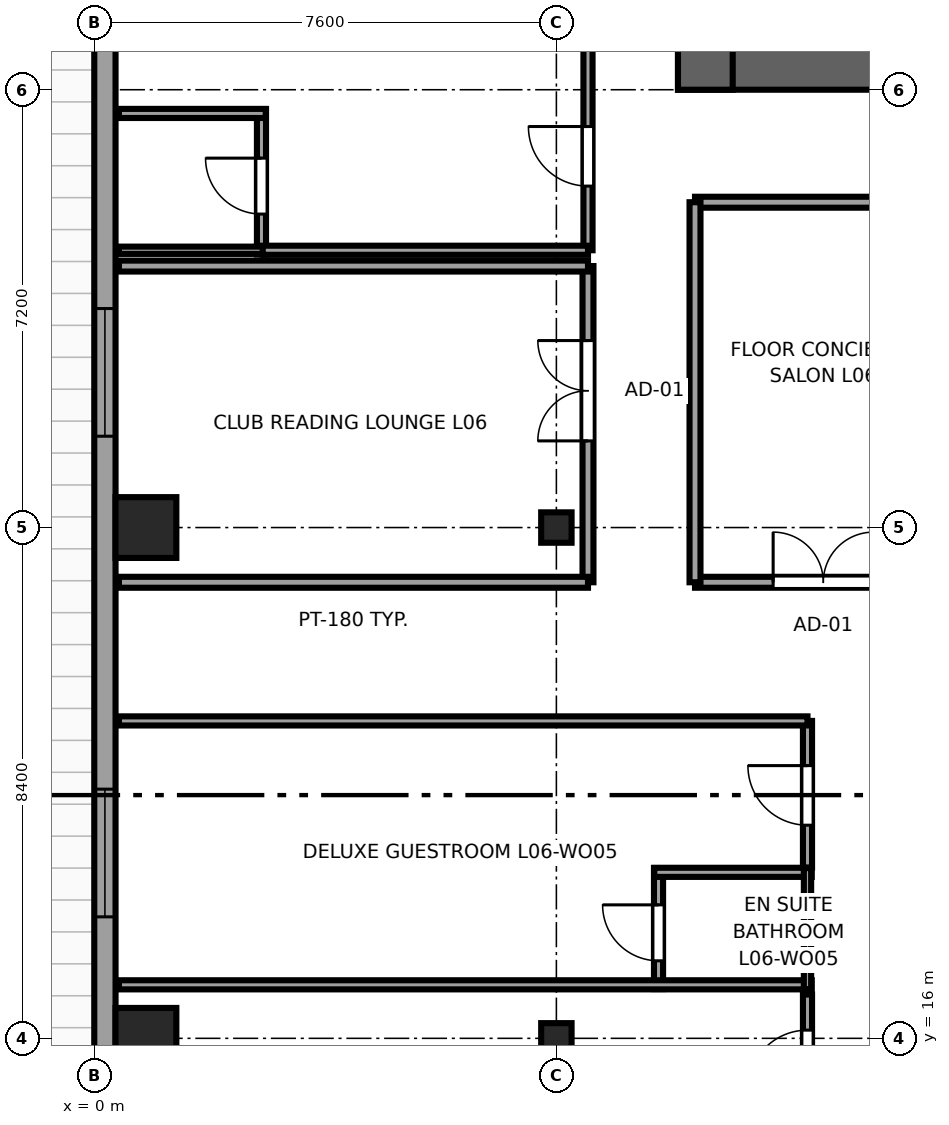
"""IFC4 building model, lengths in metres.
Left out: names, types, materials, properties, quantities, classifications, styles, units other than length and angle.
Written with IfcOpenShell. Run it as: python <this file> out.ifc"""

import sys

from ifc_helpers import new_model, si_unit, direction, frame, frame_2d, origin, origin_2d, place, context, subcontext, project, spatial, rectangle, i_section, extrude, source, transform, mapped, element, fill, save


model = new_model("IFC4")
c1 = context("Model", 3, precision=1e-05, world=origin(), true_north=direction((0.0, 1.0)))
c2 = subcontext(c1, "Body", "Model", "MODEL_VIEW")
j1 = project(units=[si_unit("LENGTHUNIT", "METRE"), si_unit("PLANEANGLEUNIT", "RADIAN")], contexts=[c1])
p1 = place(None, origin())
s1 = spatial("IfcSite", under=j1, at=p1, CompositionType="ELEMENT")
p2 = place(p1, origin())
s2 = spatial("IfcBuilding", under=s1, at=p2, CompositionType="ELEMENT")
p3 = place(p2, frame((0.0, 0.0, 32.0)))
s3 = spatial("IfcBuildingStorey", under=s2, at=p3, CompositionType="ELEMENT", Elevation=32.0)
p4 = place(p3, frame((9.6, 32.05, 0.0), z_axis=(0.0, 0.0, 1.0), x_axis=(1.0, 0.0, 0.0)))
e1 = element("IfcWall", 1, at=p4, inside=s3, PredefinedType="SHEAR", context=c2, shape_type="SweptSolid", body=[
    extrude(rectangle(XDim=26.8, YDim=0.9, at=frame_2d((13.4, 0.0))), origin(), (0.0, 0.0, 1.0), 3.55),
])
p5 = place(p4, frame((7.85, 0.0, 0.0), z_axis=(0.0, 0.0, 1.0), x_axis=(-1.0, 0.0, 0.0)))
e2 = element("IfcOpeningElement", 2, at=p5, cuts=e1, PredefinedType="OPENING", context=c2, shape_type="SweptSolid", body=[
    extrude(rectangle(XDim=1.5, YDim=2.04, at=frame_2d((0.75, 1.02))), frame((0.0, 0.46, 0.0), z_axis=(0.0, -1.0, 0.0), x_axis=(1.0, 0.0, 0.0)), (0.0, 0.0, 1.0), 0.92),
])
p6 = place(p4, frame((14.15, 0.0, 0.0), z_axis=(0.0, 0.0, 1.0), x_axis=(-1.0, 0.0, 0.0)))
e3 = element("IfcOpeningElement", 3, at=p6, cuts=e1, PredefinedType="OPENING", context=c2, shape_type="SweptSolid", body=[
    extrude(rectangle(XDim=1.5, YDim=2.04, at=frame_2d((0.75, 1.02))), frame((0.0, 0.46, 0.0), z_axis=(0.0, -1.0, 0.0), x_axis=(1.0, 0.0, 0.0)), (0.0, 0.0, 1.0), 0.92),
])
p7 = place(p4, frame((20.45, 0.0, 0.0), z_axis=(0.0, 0.0, 1.0), x_axis=(-1.0, 0.0, 0.0)))
e4 = element("IfcOpeningElement", 4, at=p7, cuts=e1, PredefinedType="OPENING", context=c2, shape_type="SweptSolid", body=[
    extrude(rectangle(XDim=1.5, YDim=2.04, at=frame_2d((0.75, 1.02))), frame((0.0, 0.46, 0.0), z_axis=(0.0, -1.0, 0.0), x_axis=(1.0, 0.0, 0.0)), (0.0, 0.0, 1.0), 0.92),
])
p8 = place(p3, frame((10.05, 31.6, 0.0), z_axis=(0.0, 0.0, 1.0), x_axis=(0.0, 1.0, 0.0)))
e5 = element("IfcWall", 5, at=p8, inside=s3, PredefinedType="SHEAR", context=c2, shape_type="SweptSolid", body=[
    extrude(rectangle(XDim=13.6, YDim=0.9, at=frame_2d((6.8, 0.0))), origin(), (0.0, 0.0, 1.0), 3.55),
])
m1 = source(origin(), c2, "Body", "SweptSolid", [
    extrude(rectangle(XDim=1.0, YDim=1.0, at=origin_2d()), origin(), (0.0, 0.0, 1.0), 3.55),
])
for number, where, z_axis, x_axis in (
    (6, (0.85, 16.0, 0.0), (0.0, 0.0, 1.0), (1.0, 0.0, 0.0)),
    (7, (0.85, 24.4, 0.0), (0.0, 0.0, 1.0), (1.0, 0.0, 0.0)),
):
    element("IfcColumn", number, at=place(p3, frame(where, z_axis=z_axis, x_axis=x_axis)), inside=s3, PredefinedType="COLUMN", context=c2, shape_type="MappedRepresentation", body=[
        mapped(m1, transform((0.0, 0.0, 0.0), x_axis=(1.0, 0.0, 0.0), y_axis=(0.0, 1.0, 0.0), z_axis=(0.0, 0.0, 1.0), scale=1.0)),
    ])
m2 = source(origin(), c2, "Body", "SweptSolid", [
    extrude(i_section(OverallWidth=0.5, OverallDepth=0.5, WebThickness=0.028, FlangeThickness=0.045, at=origin_2d()), origin(), (0.0, 0.0, 1.0), 3.55),
])
for number, where, z_axis, x_axis in (
    (8, (7.6, 16.0, 0.0), (0.0, 0.0, 1.0), (1.0, 0.0, 0.0)),
    (9, (7.6, 24.4, 0.0), (0.0, 0.0, 1.0), (1.0, 0.0, 0.0)),
):
    element("IfcColumn", number, at=place(p3, frame(where, z_axis=z_axis, x_axis=x_axis)), inside=s3, PredefinedType="COLUMN", context=c2, shape_type="MappedRepresentation", body=[
        mapped(m2, transform((0.0, 0.0, 0.0), x_axis=(1.0, 0.0, 0.0), y_axis=(0.0, 1.0, 0.0), z_axis=(0.0, 0.0, 1.0), scale=1.0)),
    ])
p9 = place(p3, frame((0.175, 41.383, 0.0), z_axis=(0.0, 0.0, 1.0), x_axis=(0.0, -1.0, 0.0)))
e10 = element("IfcWall", 10, at=p9, inside=s3, PredefinedType="SOLIDWALL", context=c2, shape_type="SweptSolid", body=[
    extrude(rectangle(XDim=36.766, YDim=0.35, at=frame_2d((18.383, 0.0))), origin(), (0.0, 0.0, 1.0), 3.37),
])
p10 = place(p9, frame((1.526, 0.0, 0.68)))
e11 = element("IfcOpeningElement", 11, at=p10, cuts=e10, PredefinedType="OPENING", context=c2, shape_type="SweptSolid", body=[
    extrude(rectangle(XDim=2.1, YDim=1.9, at=frame_2d((1.05, 0.95))), frame((0.0, 0.185, 0.0), z_axis=(0.0, -1.0, 0.0), x_axis=(1.0, 0.0, 0.0)), (0.0, 0.0, 1.0), 0.37),
])
p11 = place(p9, frame((4.428, 0.0, 0.68)))
e12 = element("IfcOpeningElement", 12, at=p11, cuts=e10, PredefinedType="OPENING", context=c2, shape_type="SweptSolid", body=[
    extrude(rectangle(XDim=2.1, YDim=1.9, at=frame_2d((1.05, 0.95))), frame((0.0, 0.185, 0.0), z_axis=(0.0, -1.0, 0.0), x_axis=(1.0, 0.0, 0.0)), (0.0, 0.0, 1.0), 0.37),
])
p12 = place(p9, frame((13.381, 0.0, 0.68)))
e13 = element("IfcOpeningElement", 13, at=p12, cuts=e10, PredefinedType="OPENING", context=c2, shape_type="SweptSolid", body=[
    extrude(rectangle(XDim=2.1, YDim=1.9, at=frame_2d((1.05, 0.95))), frame((0.0, 0.185, 0.0), z_axis=(0.0, -1.0, 0.0), x_axis=(1.0, 0.0, 0.0)), (0.0, 0.0, 1.0), 0.37),
])
p13 = place(p9, frame((21.285, 0.0, 0.68)))
e14 = element("IfcOpeningElement", 14, at=p13, cuts=e10, PredefinedType="OPENING", context=c2, shape_type="SweptSolid", body=[
    extrude(rectangle(XDim=2.1, YDim=1.9, at=frame_2d((1.05, 0.95))), frame((0.0, 0.185, 0.0), z_axis=(0.0, -1.0, 0.0), x_axis=(1.0, 0.0, 0.0)), (0.0, 0.0, 1.0), 0.37),
])
p14 = place(p9, frame((26.286, 0.0, 0.68)))
e15 = element("IfcOpeningElement", 15, at=p14, cuts=e10, PredefinedType="OPENING", context=c2, shape_type="SweptSolid", body=[
    extrude(rectangle(XDim=2.1, YDim=1.9, at=frame_2d((1.05, 0.95))), frame((0.0, 0.185, 0.0), z_axis=(0.0, -1.0, 0.0), x_axis=(1.0, 0.0, 0.0)), (0.0, 0.0, 1.0), 0.37),
])
p15 = place(p9, frame((29.188, 0.0, 0.68)))
e16 = element("IfcOpeningElement", 16, at=p15, cuts=e10, PredefinedType="OPENING", context=c2, shape_type="SweptSolid", body=[
    extrude(rectangle(XDim=2.1, YDim=1.9, at=frame_2d((1.05, 0.95))), frame((0.0, 0.185, 0.0), z_axis=(0.0, -1.0, 0.0), x_axis=(1.0, 0.0, 0.0)), (0.0, 0.0, 1.0), 0.37),
])
p16 = place(p9, frame((34.079, 0.0, 0.62)))
e17 = element("IfcOpeningElement", 17, at=p16, cuts=e10, PredefinedType="OPENING", context=c2, shape_type="SweptSolid", body=[
    extrude(rectangle(XDim=1.5, YDim=1.55, at=frame_2d((0.75, 0.775))), frame((0.0, 0.185, 0.0), z_axis=(0.0, -1.0, 0.0), x_axis=(1.0, 0.0, 0.0)), (0.0, 0.0, 1.0), 0.37),
])
p17 = place(p3, frame((9.28, 16.81, 0.0), z_axis=(0.0, 0.0, 1.0), x_axis=(0.0, 1.0, 0.0)))
e18 = element("IfcWall", 18, at=p17, inside=s3, PredefinedType="PARTITIONING", context=c2, shape_type="SweptSolid", body=[
    extrude(rectangle(XDim=1.99, YDim=0.15, at=frame_2d((0.995, 0.0))), origin(), (0.0, 0.0, 1.0), 3.37),
])
p18 = place(p17, frame((0.465, 0.0, 0.0)))
e19 = element("IfcOpeningElement", 19, at=p18, cuts=e18, PredefinedType="OPENING", context=c2, shape_type="SweptSolid", body=[
    extrude(rectangle(XDim=0.92, YDim=2.01, at=frame_2d((0.46, 1.005))), frame((0.0, 0.085, 0.0), z_axis=(0.0, -1.0, 0.0), x_axis=(1.0, 0.0, 0.0)), (0.0, 0.0, 1.0), 0.17),
])
p19 = place(p3, frame((0.405, 16.88, 0.0), z_axis=(0.0, 0.0, 1.0), x_axis=(1.0, 0.0, 0.0)))
e20 = element("IfcWall", 20, at=p19, inside=s3, PredefinedType="PARTITIONING", context=c2, shape_type="SweptSolid", body=[
    extrude(rectangle(XDim=11.395, YDim=0.15, at=frame_2d((5.698, 0.0))), origin(), (0.0, 0.0, 1.0), 3.37),
])
p20 = place(p3, frame((9.21, 18.73, 0.0), z_axis=(0.0, 0.0, 1.0), x_axis=(1.0, 0.0, 0.0)))
e21 = element("IfcWall", 21, at=p20, inside=s3, PredefinedType="PARTITIONING", context=c2, shape_type="SweptSolid", body=[
    extrude(rectangle(XDim=2.59, YDim=0.15, at=frame_2d((1.295, 0.0))), origin(), (0.0, 0.0, 1.0), 3.37),
])
p21 = place(p3, frame((11.73, 16.81, 0.0), z_axis=(0.0, 0.0, 1.0), x_axis=(0.0, 1.0, 0.0)))
e22 = element("IfcWall", 22, at=p21, inside=s3, PredefinedType="PLUMBINGWALL", context=c2, shape_type="SweptSolid", body=[
    extrude(rectangle(XDim=1.99, YDim=0.12, at=frame_2d((0.995, 0.0))), origin(), (0.0, 0.0, 1.0), 3.37),
])
p22 = place(p3, frame((2.75, 28.89, 0.0), z_axis=(0.0, 0.0, 1.0), x_axis=(0.0, 1.0, 0.0)))
e23 = element("IfcWall", 23, at=p22, inside=s3, PredefinedType="PARTITIONING", context=c2, shape_type="SweptSolid", body=[
    extrude(rectangle(XDim=2.39, YDim=0.15, at=frame_2d((1.195, 0.0))), origin(), (0.0, 0.0, 1.0), 3.37),
])
p23 = place(p22, frame((0.665, 0.0, 0.0)))
e24 = element("IfcOpeningElement", 24, at=p23, cuts=e23, PredefinedType="OPENING", context=c2, shape_type="SweptSolid", body=[
    extrude(rectangle(XDim=0.92, YDim=2.01, at=frame_2d((0.46, 1.005))), frame((0.0, 0.085, 0.0), z_axis=(0.0, -1.0, 0.0), x_axis=(1.0, 0.0, 0.0)), (0.0, 0.0, 1.0), 0.17),
])
p24 = place(p3, frame((0.405, 28.96, 0.0), z_axis=(0.0, 0.0, 1.0), x_axis=(1.0, 0.0, 0.0)))
e25 = element("IfcWall", 25, at=p24, inside=s3, PredefinedType="PLUMBINGWALL", context=c2, shape_type="SweptSolid", body=[
    extrude(rectangle(XDim=2.415, YDim=0.12, at=frame_2d((1.208, 0.0))), origin(), (0.0, 0.0, 1.0), 3.37),
])
p25 = place(p3, frame((0.405, 31.21, 0.0), z_axis=(0.0, 0.0, 1.0), x_axis=(1.0, 0.0, 0.0)))
e26 = element("IfcWall", 26, at=p25, inside=s3, PredefinedType="PARTITIONING", context=c2, shape_type="SweptSolid", body=[
    extrude(rectangle(XDim=2.415, YDim=0.15, at=frame_2d((1.208, 0.0))), origin(), (0.0, 0.0, 1.0), 3.37),
])
p26 = place(p3, frame((11.73, 14.61, 0.0), z_axis=(0.0, 0.0, 1.0), x_axis=(0.0, 1.0, 0.0)))
e27 = element("IfcWall", 27, at=p26, inside=s3, PredefinedType="PARTITIONING", context=c2, shape_type="SweptSolid", body=[
    extrude(rectangle(XDim=2.11, YDim=0.15, at=frame_2d((1.055, 0.0))), origin(), (0.0, 0.0, 1.0), 3.37),
])
p27 = place(p26, frame((0.545, 0.0, 0.0)))
e28 = element("IfcOpeningElement", 28, at=p27, cuts=e27, PredefinedType="OPENING", context=c2, shape_type="SweptSolid", body=[
    extrude(rectangle(XDim=0.98, YDim=2.12, at=frame_2d((0.49, 1.06))), frame((0.0, 0.085, 0.0), z_axis=(0.0, -1.0, 0.0), x_axis=(1.0, 0.0, 0.0)), (0.0, 0.0, 1.0), 0.17),
])
p28 = place(p3, frame((11.73, 18.81, 0.0), z_axis=(0.0, 0.0, 1.0), x_axis=(0.0, 1.0, 0.0)))
e29 = element("IfcWall", 29, at=p28, inside=s3, PredefinedType="PARTITIONING", context=c2, shape_type="SweptSolid", body=[
    extrude(rectangle(XDim=2.41, YDim=0.15, at=frame_2d((1.205, 0.0))), origin(), (0.0, 0.0, 1.0), 3.37),
])
p29 = place(p28, frame((0.695, 0.0, 0.0)))
e30 = element("IfcOpeningElement", 30, at=p29, cuts=e29, PredefinedType="OPENING", context=c2, shape_type="SweptSolid", body=[
    extrude(rectangle(XDim=0.98, YDim=2.12, at=frame_2d((0.49, 1.06))), frame((0.0, 0.085, 0.0), z_axis=(0.0, -1.0, 0.0), x_axis=(1.0, 0.0, 0.0)), (0.0, 0.0, 1.0), 0.17),
])
p30 = place(p3, frame((0.405, 21.22, 0.0), z_axis=(0.0, 0.0, 1.0), x_axis=(1.0, 0.0, 0.0)))
e31 = element("IfcWall", 31, at=p30, inside=s3, PredefinedType="PARTITIONING", context=c2, shape_type="SweptSolid", body=[
    extrude(rectangle(XDim=11.325, YDim=0.15, at=frame_2d((5.663, 0.0))), origin(), (0.0, 0.0, 1.0), 3.37),
])
p31 = place(p3, frame((8.12, 23.5, 0.0), z_axis=(0.0, 0.0, 1.0), x_axis=(0.0, 1.0, 0.0)))
e32 = element("IfcWall", 32, at=p31, inside=s3, PredefinedType="PARTITIONING", context=c2, shape_type="SweptSolid", body=[
    extrude(rectangle(XDim=5.2, YDim=0.18, at=frame_2d((2.6, 0.0))), origin(), (0.0, 0.0, 1.0), 3.37),
])
p32 = place(p31, frame((2.325, 0.0, 0.0)))
e33 = element("IfcOpeningElement", 33, at=p32, cuts=e32, PredefinedType="OPENING", context=c2, shape_type="SweptSolid", body=[
    extrude(rectangle(XDim=1.65, YDim=2.15, at=frame_2d((0.825, 1.075))), frame((0.0, 0.1, 0.0), z_axis=(0.0, -1.0, 0.0), x_axis=(1.0, 0.0, 0.0)), (0.0, 0.0, 1.0), 0.2),
])
for number, where, z_axis, x_axis in (
    (34, (0.405, 23.5, 0.0), (0.0, 0.0, 1.0), (1.0, 0.0, 0.0)),
    (35, (0.405, 28.7, 0.0), (0.0, 0.0, 1.0), (1.0, 0.0, 0.0)),
):
    element("IfcWall", number, at=place(p3, frame(where, z_axis=z_axis, x_axis=x_axis)), inside=s3, PredefinedType="PARTITIONING", context=c2, shape_type="SweptSolid", body=[
        extrude(rectangle(XDim=7.715, YDim=0.18, at=frame_2d((3.857, 0.0))), origin(), (0.0, 0.0, 1.0), 3.37),
    ])
p33 = place(p3, frame((8.12, 28.96, 0.0), z_axis=(0.0, 0.0, 1.0), x_axis=(0.0, 1.0, 0.0)))
e36 = element("IfcWall", 36, at=p33, inside=s3, PredefinedType="PARTITIONING", context=c2, shape_type="SweptSolid", body=[
    extrude(rectangle(XDim=16.635, YDim=0.15, at=frame_2d((8.317, 0.0))), origin(), (0.0, 0.0, 1.0), 3.37),
])
p34 = place(p33, frame((1.055, 0.0, 0.0)))
e37 = element("IfcOpeningElement", 37, at=p34, cuts=e36, PredefinedType="OPENING", context=c2, shape_type="SweptSolid", body=[
    extrude(rectangle(XDim=0.98, YDim=2.12, at=frame_2d((0.49, 1.06))), frame((0.0, 0.085, 0.0), z_axis=(0.0, -1.0, 0.0), x_axis=(1.0, 0.0, 0.0)), (0.0, 0.0, 1.0), 0.17),
])
p35 = place(p3, frame((2.77, 28.96, 0.0), z_axis=(0.0, 0.0, 1.0), x_axis=(1.0, 0.0, 0.0)))
e38 = element("IfcWall", 38, at=p35, inside=s3, PredefinedType="PARTITIONING", context=c2, shape_type="SweptSolid", body=[
    extrude(rectangle(XDim=5.35, YDim=0.15, at=frame_2d((2.675, 0.0))), origin(), (0.0, 0.0, 1.0), 3.37),
])
p36 = place(p3, frame((9.88, 23.5, 0.0), z_axis=(0.0, 0.0, 1.0), x_axis=(1.0, 0.0, 0.0)))
e39 = element("IfcWall", 39, at=p36, inside=s3, PredefinedType="PARTITIONING", context=c2, shape_type="SweptSolid", body=[
    extrude(rectangle(XDim=4.22, YDim=0.18, at=frame_2d((2.11, 0.0))), origin(), (0.0, 0.0, 1.0), 3.37),
])
p37 = place(p36, frame((1.285, 0.0, 0.0)))
e40 = element("IfcOpeningElement", 40, at=p37, cuts=e39, PredefinedType="OPENING", context=c2, shape_type="SweptSolid", body=[
    extrude(rectangle(XDim=1.65, YDim=2.15, at=frame_2d((0.825, 1.075))), frame((0.0, 0.1, 0.0), z_axis=(0.0, -1.0, 0.0), x_axis=(1.0, 0.0, 0.0)), (0.0, 0.0, 1.0), 0.2),
])
p38 = place(p3, frame((9.88, 29.75, 0.0), z_axis=(0.0, 0.0, 1.0), x_axis=(1.0, 0.0, 0.0)))
e41 = element("IfcWall", 41, at=p38, inside=s3, PredefinedType="PARTITIONING", context=c2, shape_type="SweptSolid", body=[
    extrude(rectangle(XDim=4.22, YDim=0.18, at=frame_2d((2.11, 0.0))), origin(), (0.0, 0.0, 1.0), 3.37),
])
p39 = place(p3, frame((9.88, 23.5, 0.0), z_axis=(0.0, 0.0, 1.0), x_axis=(0.0, 1.0, 0.0)))
e42 = element("IfcWall", 42, at=p39, inside=s3, PredefinedType="PARTITIONING", context=c2, shape_type="SweptSolid", body=[
    extrude(rectangle(XDim=6.25, YDim=0.18, at=frame_2d((3.125, 0.0))), origin(), (0.0, 0.0, 1.0), 3.37),
])
m3 = source(origin(), c2, "Body", "SweptSolid", [
    extrude(rectangle(XDim=2.1, YDim=1.9, at=frame_2d((1.05, 0.95))), frame((0.0, 0.09, 0.0), z_axis=(0.0, -1.0, 0.0), x_axis=(1.0, 0.0, 0.0)), (0.0, 0.0, 1.0), 0.06),
])
p40 = place(p12, origin())
e43 = element("IfcWindow", 43, at=p40, inside=s3, PartitioningType="TRIPLE_PANEL_HORIZONTAL", PredefinedType="WINDOW", context=c2, shape_type="MappedRepresentation", body=[
    mapped(m3, transform((0.0, 0.0, 0.0), x_axis=(1.0, 0.0, 0.0), y_axis=(0.0, 1.0, 0.0), z_axis=(0.0, 0.0, 1.0), scale=1.0)),
])
fill(e13, e43)
p41 = place(p13, origin())
e44 = element("IfcWindow", 44, at=p41, inside=s3, PartitioningType="TRIPLE_PANEL_HORIZONTAL", PredefinedType="WINDOW", context=c2, shape_type="MappedRepresentation", body=[
    mapped(m3, transform((0.0, 0.0, 0.0), x_axis=(1.0, 0.0, 0.0), y_axis=(0.0, 1.0, 0.0), z_axis=(0.0, 0.0, 1.0), scale=1.0)),
])
fill(e14, e44)
m4 = source(origin(), c2, "Body", "SweptSolid", [
    extrude(rectangle(XDim=0.92, YDim=2.01, at=frame_2d((0.46, 1.005))), frame((0.0, 0.025, 0.0), z_axis=(0.0, -1.0, 0.0), x_axis=(1.0, 0.0, 0.0)), (0.0, 0.0, 1.0), 0.05),
])
p42 = place(p18, origin())
e45 = element("IfcDoor", 45, at=p42, inside=s3, OperationType="SINGLE_SWING_RIGHT", PredefinedType="DOOR", context=c2, shape_type="MappedRepresentation", body=[
    mapped(m4, transform((0.0, 0.0, 0.0), x_axis=(1.0, 0.0, 0.0), y_axis=(0.0, 1.0, 0.0), z_axis=(0.0, 0.0, 1.0), scale=1.0)),
])
fill(e19, e45)
p43 = place(p23, origin())
e46 = element("IfcDoor", 46, at=p43, inside=s3, OperationType="SINGLE_SWING_RIGHT", PredefinedType="DOOR", context=c2, shape_type="MappedRepresentation", body=[
    mapped(m4, transform((0.0, 0.0, 0.0), x_axis=(1.0, 0.0, 0.0), y_axis=(0.0, 1.0, 0.0), z_axis=(0.0, 0.0, 1.0), scale=1.0)),
])
fill(e24, e46)
m5 = source(origin(), c2, "Body", "SweptSolid", [
    extrude(rectangle(XDim=0.98, YDim=2.12, at=frame_2d((0.49, 1.06))), frame((0.0, 0.025, 0.0), z_axis=(0.0, -1.0, 0.0), x_axis=(1.0, 0.0, 0.0)), (0.0, 0.0, 1.0), 0.05),
])
p44 = place(p27, origin())
e47 = element("IfcDoor", 47, at=p44, inside=s3, OperationType="SINGLE_SWING_LEFT", PredefinedType="DOOR", context=c2, shape_type="MappedRepresentation", body=[
    mapped(m5, transform((0.0, 0.0, 0.0), x_axis=(1.0, 0.0, 0.0), y_axis=(0.0, 1.0, 0.0), z_axis=(0.0, 0.0, 1.0), scale=1.0)),
])
fill(e28, e47)
p45 = place(p29, origin())
e48 = element("IfcDoor", 48, at=p45, inside=s3, OperationType="SINGLE_SWING_RIGHT", PredefinedType="DOOR", context=c2, shape_type="MappedRepresentation", body=[
    mapped(m5, transform((0.0, 0.0, 0.0), x_axis=(1.0, 0.0, 0.0), y_axis=(0.0, 1.0, 0.0), z_axis=(0.0, 0.0, 1.0), scale=1.0)),
])
fill(e30, e48)
m6 = source(origin(), c2, "Body", "SweptSolid", [
    extrude(rectangle(XDim=1.65, YDim=2.15, at=frame_2d((0.825, 1.075))), frame((0.0, 0.025, 0.0), z_axis=(0.0, -1.0, 0.0), x_axis=(1.0, 0.0, 0.0)), (0.0, 0.0, 1.0), 0.05),
])
p46 = place(p32, origin())
e49 = element("IfcDoor", 49, at=p46, inside=s3, OperationType="DOUBLE_DOOR_SINGLE_SWING", PredefinedType="DOOR", context=c2, shape_type="MappedRepresentation", body=[
    mapped(m6, transform((0.0, 0.0, 0.0), x_axis=(1.0, 0.0, 0.0), y_axis=(0.0, 1.0, 0.0), z_axis=(0.0, 0.0, 1.0), scale=1.0)),
])
fill(e33, e49)
p47 = place(p34, origin())
e50 = element("IfcDoor", 50, at=p47, inside=s3, OperationType="SINGLE_SWING_RIGHT", PredefinedType="DOOR", context=c2, shape_type="MappedRepresentation", body=[
    mapped(m5, transform((0.0, 0.0, 0.0), x_axis=(1.0, 0.0, 0.0), y_axis=(0.0, 1.0, 0.0), z_axis=(0.0, 0.0, 1.0), scale=1.0)),
])
fill(e37, e50)
p48 = place(p37, origin())
e51 = element("IfcDoor", 51, at=p48, inside=s3, OperationType="DOUBLE_DOOR_SINGLE_SWING", PredefinedType="DOOR", context=c2, shape_type="MappedRepresentation", body=[
    mapped(m6, transform((0.0, 0.0, 0.0), x_axis=(1.0, 0.0, 0.0), y_axis=(0.0, 1.0, 0.0), z_axis=(0.0, 0.0, 1.0), scale=1.0)),
])
fill(e40, e51)
save(model, sys.argv[1])
